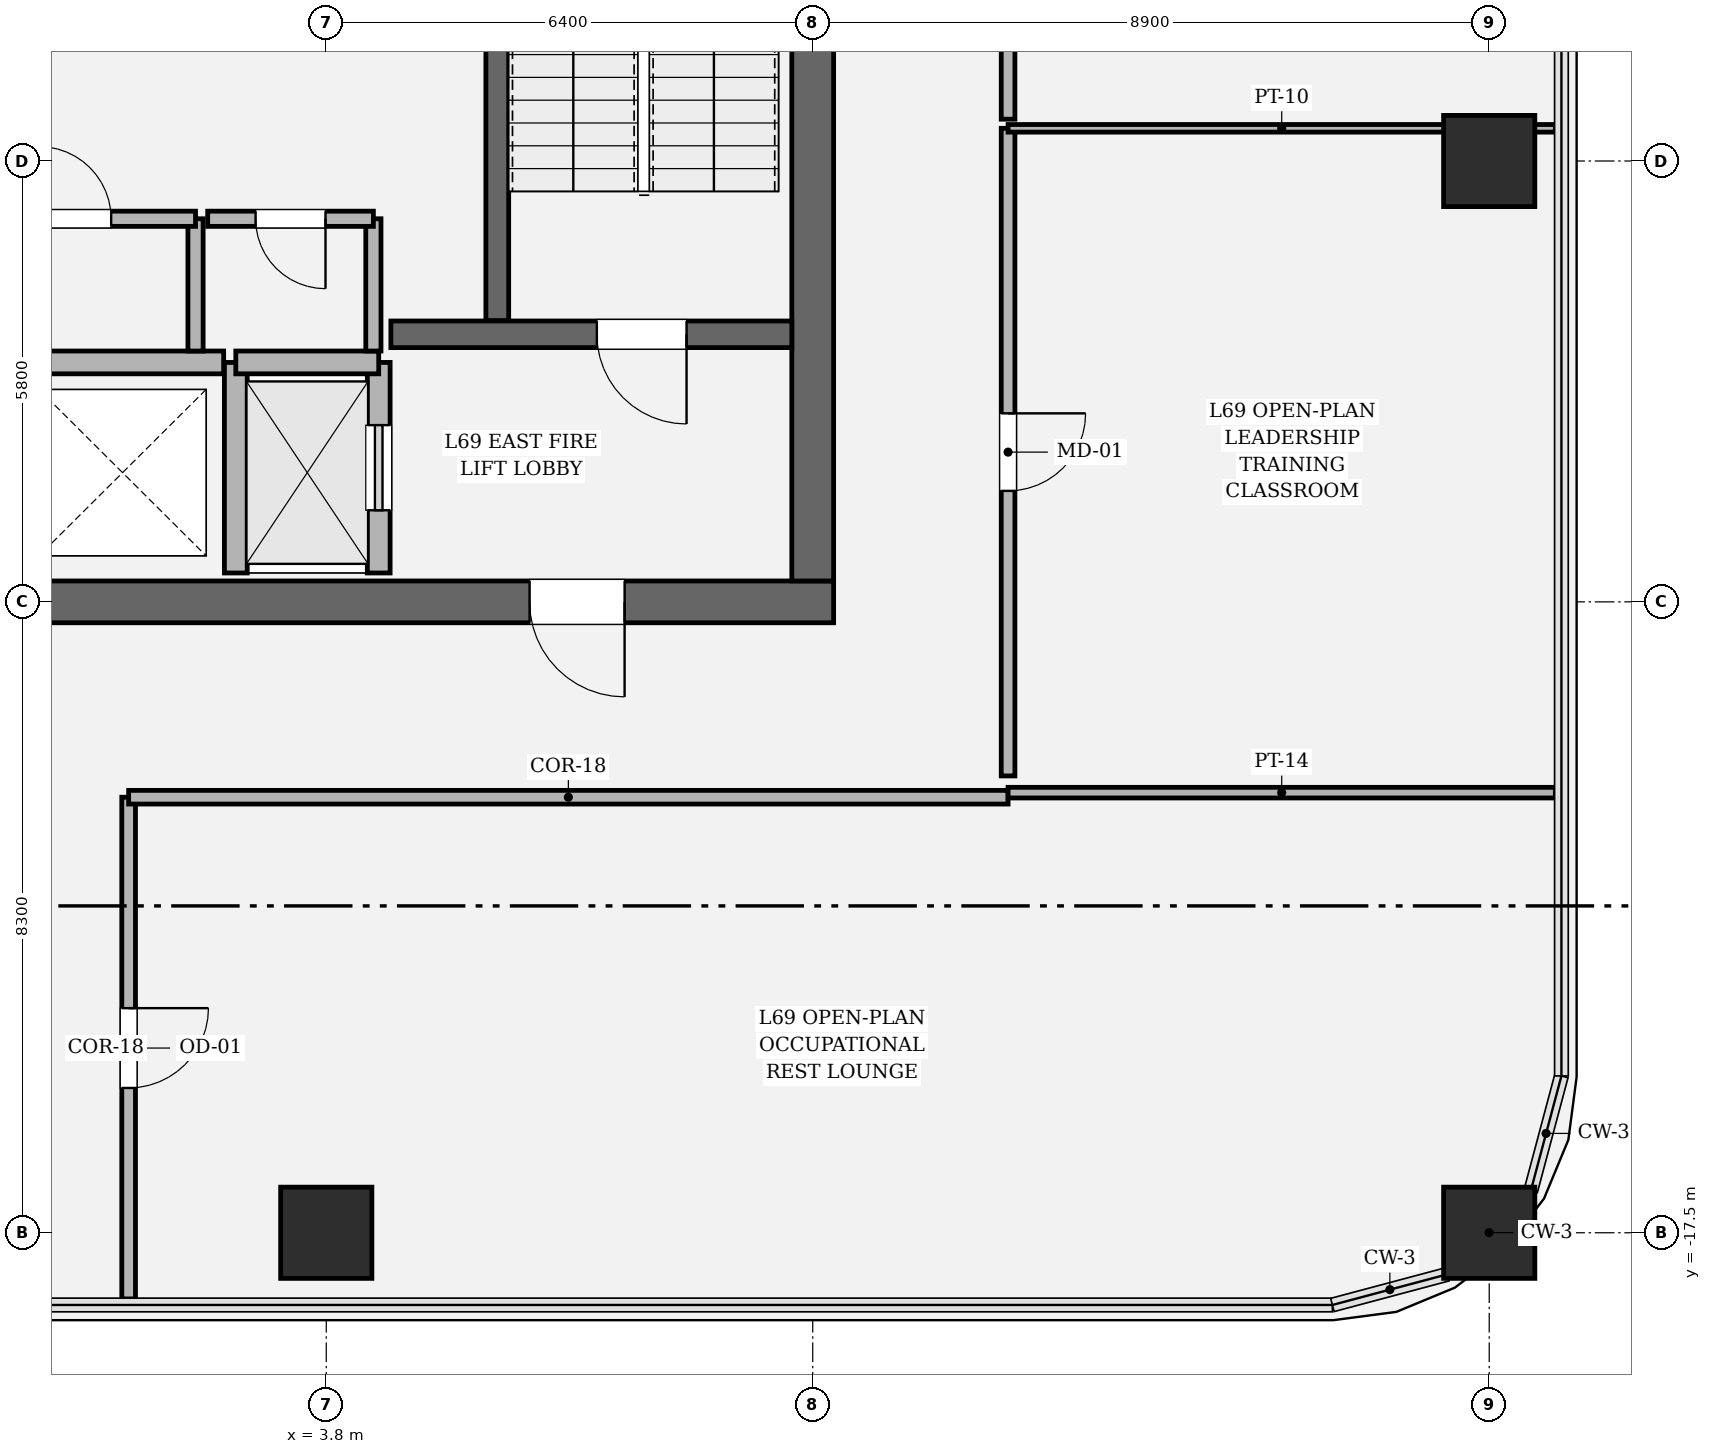
"""IFC4 building model, lengths in metres.
Left out: names, types, materials, properties, quantities, classifications, styles, units other than length and angle.
Written with IfcOpenShell. Run it as: python <this file> out.ifc"""

import sys

from ifc_helpers import new_model, si_unit, direction, frame, frame_2d, origin, origin_2d, place, context, subcontext, project, spatial, rectangle, hollow_rectangle, extrude, element, fill, save


model = new_model("IFC4")
c1 = context("Model", 3, precision=1e-05, world=origin(), true_north=direction((0.0, 1.0)))
c2 = subcontext(c1, "Body", "Model", "MODEL_VIEW")
j1 = project(units=[si_unit("LENGTHUNIT", "METRE"), si_unit("PLANEANGLEUNIT", "RADIAN")], contexts=[c1])
p1 = place(None, origin())
s1 = spatial("IfcSite", under=j1, at=p1, CompositionType="ELEMENT")
p2 = place(p1, origin())
s2 = spatial("IfcBuilding", under=s1, at=p2, CompositionType="ELEMENT")
p3 = place(p2, frame((0.0, 0.0, 292.2)))
s3 = spatial("IfcBuildingStorey", under=s2, at=p3, CompositionType="ELEMENT", Elevation=292.2)
p4 = place(p3, frame((10.475, -9.2, 0.0), z_axis=(0.0, 0.0, 1.0), x_axis=(-1.0, 0.0, 0.0)))
e1 = element("IfcWall", 1, at=p4, inside=s3, PredefinedType="SHEAR", context=c2, shape_type="SweptSolid", body=[
    extrude(rectangle(XDim=20.95, YDim=0.55, at=frame_2d((10.475, 0.0))), origin(), (0.0, 0.0, 1.0), 4.2),
])
p5 = place(p4, frame((2.75, 0.0, 0.0)))
e2 = element("IfcOpeningElement", 2, at=p5, cuts=e1, PredefinedType="OPENING", context=c2, shape_type="SweptSolid", body=[
    extrude(rectangle(XDim=1.25, YDim=2.25, at=frame_2d((0.625, 1.125))), frame((0.0, 0.285, 0.0), z_axis=(0.0, -1.0, 0.0), x_axis=(1.0, 0.0, 0.0)), (0.0, 0.0, 1.0), 0.57),
])
p6 = place(p4, frame((16.95, 0.0, 0.0)))
e3 = element("IfcOpeningElement", 3, at=p6, cuts=e1, PredefinedType="OPENING", context=c2, shape_type="SweptSolid", body=[
    extrude(rectangle(XDim=1.25, YDim=2.25, at=frame_2d((0.625, 1.125))), frame((0.0, 0.285, 0.0), z_axis=(0.0, -1.0, 0.0), x_axis=(1.0, 0.0, 0.0)), (0.0, 0.0, 1.0), 0.57),
])
p7 = place(p3, frame((10.2, 8.925, 0.0), z_axis=(0.0, 0.0, 1.0), x_axis=(0.0, -1.0, 0.0)))
e4 = element("IfcWall", 4, at=p7, inside=s3, PredefinedType="SHEAR", context=c2, shape_type="SweptSolid", body=[
    extrude(rectangle(XDim=17.85, YDim=0.55, at=frame_2d((8.925, 0.0))), origin(), (0.0, 0.0, 1.0), 4.2),
])
p8 = place(p7, frame((3.955, 0.0, 0.0)))
e5 = element("IfcOpeningElement", 5, at=p8, cuts=e4, PredefinedType="OPENING", context=c2, shape_type="SweptSolid", body=[
    extrude(rectangle(XDim=1.18, YDim=2.2, at=frame_2d((0.59, 1.1))), frame((0.0, 0.285, 0.0), z_axis=(0.0, -1.0, 0.0), x_axis=(1.0, 0.0, 0.0)), (0.0, 0.0, 1.0), 0.57),
])
p9 = place(p3, frame((6.05, 3.45, 0.0), z_axis=(0.0, 0.0, 1.0), x_axis=(0.0, -1.0, 0.0)))
e6 = element("IfcWall", 6, at=p9, inside=s3, PredefinedType="SOLIDWALL", context=c2, shape_type="SweptSolid", body=[
    extrude(rectangle(XDim=8.95, YDim=0.3, at=frame_2d((4.475, 0.0))), origin(), (0.0, 0.0, 1.0), 4.2),
])
p10 = place(p3, frame((4.65, -5.68, 0.0), z_axis=(0.0, 0.0, 1.0), x_axis=(1.0, 0.0, 0.0)))
e7 = element("IfcWall", 7, at=p10, inside=s3, PredefinedType="SOLIDWALL", context=c2, shape_type="SweptSolid", body=[
    extrude(rectangle(XDim=5.275, YDim=0.35, at=frame_2d((2.638, 0.0))), origin(), (0.0, 0.0, 1.0), 4.2),
])
p11 = place(p10, frame((2.71, 0.0, 0.0)))
e8 = element("IfcOpeningElement", 8, at=p11, cuts=e7, PredefinedType="OPENING", context=c2, shape_type="SweptSolid", body=[
    extrude(rectangle(XDim=1.18, YDim=2.2, at=frame_2d((0.59, 1.1))), frame((0.0, 0.185, 0.0), z_axis=(0.0, -1.0, 0.0), x_axis=(1.0, 0.0, 0.0)), (0.0, 0.0, 1.0), 0.37),
])
for number, where, z_axis, x_axis in (
    (9, (3.8, -17.5, 0.0), (0.0, 0.0, 1.0), (1.0, 0.0, 0.0)),
    (10, (19.1, -17.5, 0.0), (0.0, 0.0, 1.0), (1.0, 0.0, 0.0)),
    (11, (19.1, -3.4, 0.0), (0.0, 0.0, 1.0), (1.0, 0.0, 0.0)),
):
    element("IfcColumn", number, at=place(p3, frame(where, z_axis=z_axis, x_axis=x_axis)), inside=s3, PredefinedType="COLUMN", context=c2, shape_type="SweptSolid", body=[
        extrude(hollow_rectangle(XDim=1.2, YDim=1.2, WallThickness=0.035, at=origin_2d()), origin(), (0.0, 0.0, 1.0), 4.2),
    ])
p12 = place(p3, frame((4.49, -8.82, 0.0), z_axis=(0.0, 0.0, 1.0), x_axis=(0.0, 1.0, 0.0)))
e12 = element("IfcWall", 12, at=p12, inside=s3, PredefinedType="SOLIDWALL", context=c2, shape_type="SweptSolid", body=[
    extrude(rectangle(XDim=2.77, YDim=0.3, at=frame_2d((1.385, 0.0))), origin(), (0.0, 0.0, 1.0), 4.0),
])
p13 = place(p12, frame((0.825, 0.0, 0.0)))
e13 = element("IfcOpeningElement", 13, at=p13, cuts=e12, PredefinedType="OPENING", context=c2, shape_type="SweptSolid", body=[
    extrude(rectangle(XDim=1.12, YDim=2.25, at=frame_2d((0.56, 1.125))), frame((0.0, 0.16, 0.0), z_axis=(0.0, -1.0, 0.0), x_axis=(1.0, 0.0, 0.0)), (0.0, 0.0, 1.0), 0.32),
])
p14 = place(p3, frame((2.61, -8.82, 0.0), z_axis=(0.0, 0.0, 1.0), x_axis=(0.0, 1.0, 0.0)))
e14 = element("IfcWall", 14, at=p14, inside=s3, PredefinedType="SOLIDWALL", context=c2, shape_type="SweptSolid", body=[
    extrude(rectangle(XDim=2.77, YDim=0.3, at=frame_2d((1.385, 0.0))), origin(), (0.0, 0.0, 1.0), 4.0),
])
p15 = place(p3, frame((2.61, -6.05, 0.0), z_axis=(0.0, 0.0, 1.0), x_axis=(1.0, 0.0, 0.0)))
e15 = element("IfcWall", 15, at=p15, inside=s3, PredefinedType="SOLIDWALL", context=c2, shape_type="SweptSolid", body=[
    extrude(rectangle(XDim=1.88, YDim=0.3, at=frame_2d((0.94, 0.0))), origin(), (0.0, 0.0, 1.0), 4.0),
])
p16 = place(p3, frame((-2.45, -6.05, 0.0), z_axis=(0.0, 0.0, 1.0), x_axis=(1.0, 0.0, 0.0)))
e16 = element("IfcWall", 16, at=p16, inside=s3, PredefinedType="SOLIDWALL", context=c2, shape_type="SweptSolid", body=[
    extrude(rectangle(XDim=4.9, YDim=0.3, at=frame_2d((2.45, 0.0))), origin(), (0.0, 0.0, 1.0), 4.0),
])
p17 = place(p3, frame((2.08, -5.9, 0.0), z_axis=(0.0, 0.0, 1.0), x_axis=(0.0, 1.0, 0.0)))
e17 = element("IfcWall", 17, at=p17, inside=s3, PredefinedType="SOLIDWALL", context=c2, shape_type="SweptSolid", body=[
    extrude(rectangle(XDim=1.74, YDim=0.2, at=frame_2d((0.87, 0.0))), origin(), (0.0, 0.0, 1.0), 4.0),
])
p18 = place(p3, frame((2.08, -4.16, 0.0), z_axis=(0.0, 0.0, 1.0), x_axis=(-1.0, 0.0, 0.0)))
e18 = element("IfcWall", 18, at=p18, inside=s3, PredefinedType="SOLIDWALL", context=c2, shape_type="SweptSolid", body=[
    extrude(rectangle(XDim=3.17, YDim=0.2, at=frame_2d((1.585, 0.0))), origin(), (0.0, 0.0, 1.0), 4.0),
])
p19 = place(p18, frame((1.11, 0.0, 0.0)))
e19 = element("IfcOpeningElement", 19, at=p19, cuts=e18, PredefinedType="OPENING", context=c2, shape_type="SweptSolid", body=[
    extrude(rectangle(XDim=0.95, YDim=2.15, at=frame_2d((0.475, 1.075))), frame((0.0, 0.11, 0.0), z_axis=(0.0, -1.0, 0.0), x_axis=(1.0, 0.0, 0.0)), (0.0, 0.0, 1.0), 0.22),
])
p20 = place(p3, frame((4.42, -5.9, 0.0), z_axis=(0.0, 0.0, 1.0), x_axis=(0.0, 1.0, 0.0)))
e20 = element("IfcWall", 20, at=p20, inside=s3, PredefinedType="SOLIDWALL", context=c2, shape_type="SweptSolid", body=[
    extrude(rectangle(XDim=1.74, YDim=0.2, at=frame_2d((0.87, 0.0))), origin(), (0.0, 0.0, 1.0), 4.0),
])
p21 = place(p3, frame((4.42, -4.16, 0.0), z_axis=(0.0, 0.0, 1.0), x_axis=(-1.0, 0.0, 0.0)))
e21 = element("IfcWall", 21, at=p21, inside=s3, PredefinedType="SOLIDWALL", context=c2, shape_type="SweptSolid", body=[
    extrude(rectangle(XDim=2.18, YDim=0.2, at=frame_2d((1.09, 0.0))), origin(), (0.0, 0.0, 1.0), 4.0),
])
p22 = place(p21, frame((0.63, 0.0, 0.0)))
e22 = element("IfcOpeningElement", 22, at=p22, cuts=e21, PredefinedType="OPENING", context=c2, shape_type="SweptSolid", body=[
    extrude(rectangle(XDim=0.92, YDim=2.1, at=frame_2d((0.46, 1.05))), frame((0.0, 0.11, 0.0), z_axis=(0.0, -1.0, 0.0), x_axis=(1.0, 0.0, 0.0)), (0.0, 0.0, 1.0), 0.22),
])
p23 = place(p3, frame((1.2, -18.37, 0.0), z_axis=(0.0, 0.0, 1.0), x_axis=(0.0, 1.0, 0.0)))
e23 = element("IfcWall", 23, at=p23, inside=s3, PredefinedType="PARTITIONING", context=c2, shape_type="SweptSolid", body=[
    extrude(rectangle(XDim=6.6, YDim=0.18, at=frame_2d((3.3, 0.0))), origin(), (0.0, 0.0, 1.0), 3.394),
])
p24 = place(p23, frame((2.775, 0.0, 0.0)))
e24 = element("IfcOpeningElement", 24, at=p24, cuts=e23, PredefinedType="OPENING", context=c2, shape_type="SweptSolid", body=[
    extrude(rectangle(XDim=1.05, YDim=2.2, at=frame_2d((0.525, 1.1))), frame((0.0, 0.1, 0.0), z_axis=(0.0, -1.0, 0.0), x_axis=(1.0, 0.0, 0.0)), (0.0, 0.0, 1.0), 0.2),
])
p25 = place(p3, frame((1.2, -11.77, 0.0), z_axis=(0.0, 0.0, 1.0), x_axis=(1.0, 0.0, 0.0)))
e25 = element("IfcWall", 25, at=p25, inside=s3, PredefinedType="PARTITIONING", context=c2, shape_type="SweptSolid", body=[
    extrude(rectangle(XDim=11.57, YDim=0.18, at=frame_2d((5.785, 0.0))), origin(), (0.0, 0.0, 1.0), 3.394),
])
p26 = place(p3, frame((12.77, -11.71, 0.0), z_axis=(0.0, 0.0, 1.0), x_axis=(1.0, 0.0, 0.0)))
e26 = element("IfcWall", 26, at=p26, inside=s3, PredefinedType="PARTITIONING", context=c2, shape_type="SweptSolid", body=[
    extrude(rectangle(XDim=7.2, YDim=0.14, at=frame_2d((3.6, 0.0))), origin(), (0.0, 0.0, 1.0), 3.394),
])
p27 = place(p3, frame((12.77, -11.49, 0.0), z_axis=(0.0, 0.0, 1.0), x_axis=(0.0, 1.0, 0.0)))
e27 = element("IfcWall", 27, at=p27, inside=s3, PredefinedType="PARTITIONING", context=c2, shape_type="SweptSolid", body=[
    extrude(rectangle(XDim=8.52, YDim=0.18, at=frame_2d((4.26, 0.0))), origin(), (0.0, 0.0, 1.0), 3.394),
])
p28 = place(p27, frame((3.75, 0.0, 0.0)))
e28 = element("IfcOpeningElement", 28, at=p28, cuts=e27, PredefinedType="OPENING", context=c2, shape_type="SweptSolid", body=[
    extrude(rectangle(XDim=1.02, YDim=2.2, at=frame_2d((0.51, 1.1))), frame((0.0, 0.1, 0.0), z_axis=(0.0, -1.0, 0.0), x_axis=(1.0, 0.0, 0.0)), (0.0, 0.0, 1.0), 0.2),
])
p29 = place(p3, frame((12.77, -2.97, 0.0), z_axis=(0.0, 0.0, 1.0), x_axis=(1.0, 0.0, 0.0)))
e29 = element("IfcWall", 29, at=p29, inside=s3, PredefinedType="PARTITIONING", context=c2, shape_type="SweptSolid", body=[
    extrude(rectangle(XDim=7.2, YDim=0.1, at=frame_2d((3.6, 0.0))), origin(), (0.0, 0.0, 1.0), 3.394),
])
p30 = place(p3, frame((12.77, -2.85, 0.0), z_axis=(0.0, 0.0, 1.0), x_axis=(0.0, 1.0, 0.0)))
e30 = element("IfcWall", 30, at=p30, inside=s3, PredefinedType="PARTITIONING", context=c2, shape_type="SweptSolid", body=[
    extrude(rectangle(XDim=7.98, YDim=0.18, at=frame_2d((3.99, 0.0))), origin(), (0.0, 0.0, 1.0), 3.394),
])
p31 = place(p30, frame((3.465, 0.0, 0.0)))
e31 = element("IfcOpeningElement", 31, at=p31, cuts=e30, PredefinedType="OPENING", context=c2, shape_type="SweptSolid", body=[
    extrude(rectangle(XDim=1.05, YDim=2.2, at=frame_2d((0.525, 1.1))), frame((0.0, 0.1, 0.0), z_axis=(0.0, -1.0, 0.0), x_axis=(1.0, 0.0, 0.0)), (0.0, 0.0, 1.0), 0.2),
])
p32 = place(p11, origin())
e32 = element("IfcDoor", 32, at=p32, inside=s3, OperationType="SINGLE_SWING_RIGHT", PredefinedType="DOOR", context=c2, shape_type="SweptSolid", body=[
    extrude(rectangle(XDim=1.18, YDim=2.2, at=frame_2d((0.59, 1.1))), frame((0.0, 0.025, 0.0), z_axis=(0.0, -1.0, 0.0), x_axis=(1.0, 0.0, 0.0)), (0.0, 0.0, 1.0), 0.05),
])
fill(e8, e32)
p33 = place(p5, origin())
e33 = element("IfcDoor", 33, at=p33, inside=s3, OperationType="SINGLE_SWING_LEFT", PredefinedType="DOOR", context=c2, shape_type="SweptSolid", body=[
    extrude(rectangle(XDim=1.25, YDim=2.25, at=frame_2d((0.625, 1.125))), frame((0.0, 0.025, 0.0), z_axis=(0.0, -1.0, 0.0), x_axis=(1.0, 0.0, 0.0)), (0.0, 0.0, 1.0), 0.05),
])
fill(e2, e33)
p34 = place(p13, origin())
e34 = element("IfcDoor", 34, at=p34, inside=s3, OperationType="SLIDING_TO_RIGHT", PredefinedType="DOOR", context=c2, shape_type="SweptSolid", body=[
    extrude(rectangle(XDim=1.12, YDim=2.25, at=frame_2d((0.56, 1.125))), frame((0.0, 0.025, 0.0), z_axis=(0.0, -1.0, 0.0), x_axis=(1.0, 0.0, 0.0)), (0.0, 0.0, 1.0), 0.05),
])
fill(e13, e34)
p35 = place(p19, origin())
e35 = element("IfcDoor", 35, at=p35, inside=s3, OperationType="SINGLE_SWING_RIGHT", PredefinedType="DOOR", context=c2, shape_type="SweptSolid", body=[
    extrude(rectangle(XDim=0.95, YDim=2.15, at=frame_2d((0.475, 1.075))), frame((0.0, 0.025, 0.0), z_axis=(0.0, -1.0, 0.0), x_axis=(1.0, 0.0, 0.0)), (0.0, 0.0, 1.0), 0.05),
])
fill(e19, e35)
p36 = place(p22, origin())
e36 = element("IfcDoor", 36, at=p36, inside=s3, OperationType="SINGLE_SWING_LEFT", PredefinedType="DOOR", context=c2, shape_type="SweptSolid", body=[
    extrude(rectangle(XDim=0.92, YDim=2.1, at=frame_2d((0.46, 1.05))), frame((0.0, 0.025, 0.0), z_axis=(0.0, -1.0, 0.0), x_axis=(1.0, 0.0, 0.0)), (0.0, 0.0, 1.0), 0.05),
])
fill(e22, e36)
p37 = place(p24, origin())
e37 = element("IfcDoor", 37, at=p37, inside=s3, OperationType="SINGLE_SWING_RIGHT", PredefinedType="DOOR", context=c2, shape_type="SweptSolid", body=[
    extrude(rectangle(XDim=1.05, YDim=2.2, at=frame_2d((0.525, 1.1))), frame((0.0, 0.025, 0.0), z_axis=(0.0, -1.0, 0.0), x_axis=(1.0, 0.0, 0.0)), (0.0, 0.0, 1.0), 0.05),
])
fill(e24, e37)
p38 = place(p28, origin())
e38 = element("IfcDoor", 38, at=p38, inside=s3, OperationType="SINGLE_SWING_RIGHT", PredefinedType="DOOR", context=c2, shape_type="SweptSolid", body=[
    extrude(rectangle(XDim=1.02, YDim=2.2, at=frame_2d((0.51, 1.1))), frame((0.0, 0.025, 0.0), z_axis=(0.0, -1.0, 0.0), x_axis=(1.0, 0.0, 0.0)), (0.0, 0.0, 1.0), 0.05),
])
fill(e28, e38)
save(model, sys.argv[1])
